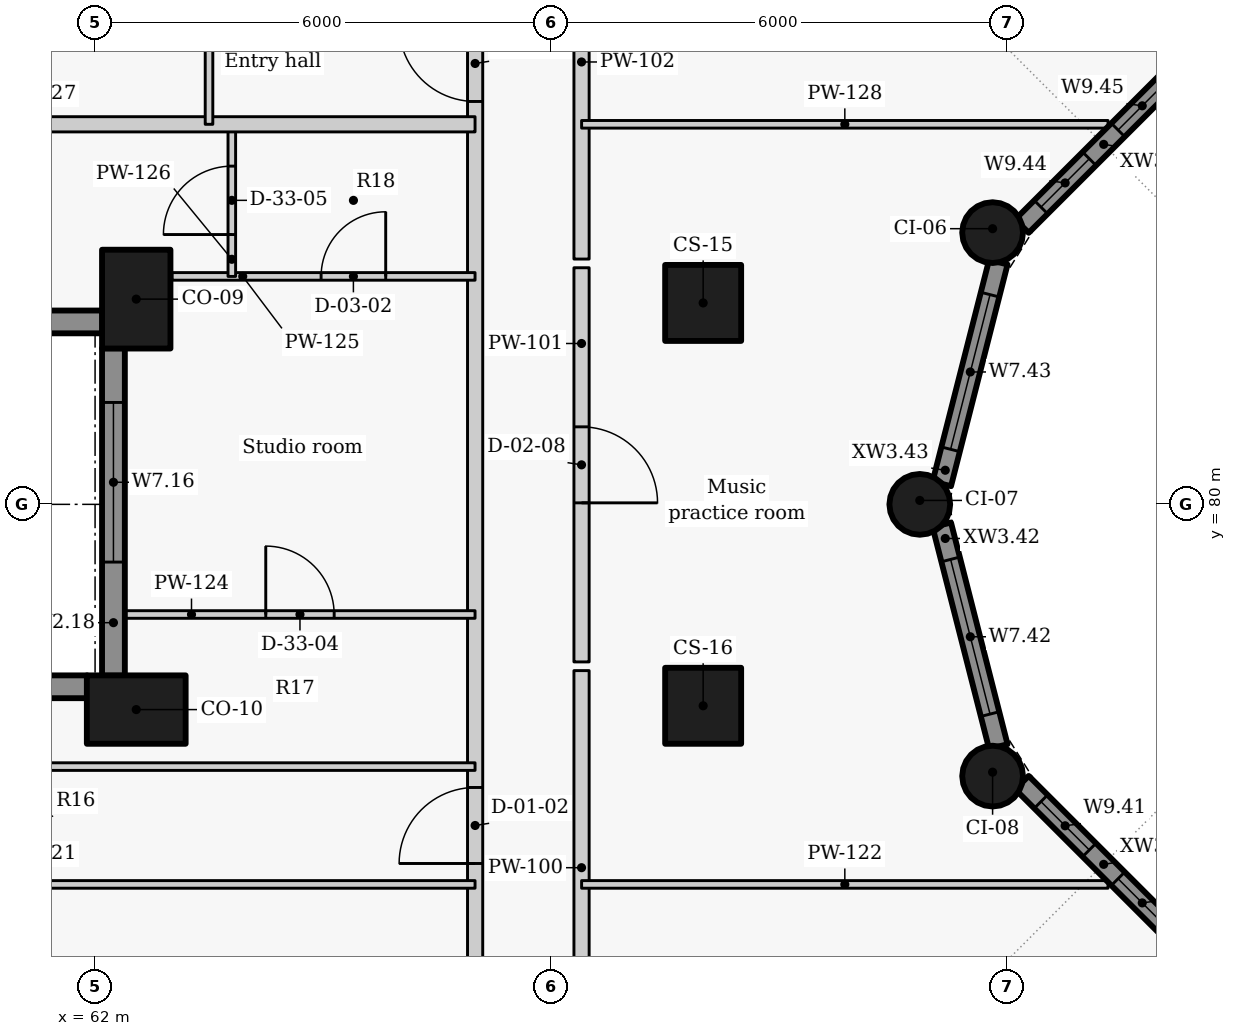
"""IFC4 building model, lengths in metres.
Left out: names, types, materials, properties, quantities, classifications, styles, units other than length and angle.
Written with IfcOpenShell. Run it as: python <this file> out.ifc"""

import sys

from ifc_helpers import new_model, si_unit, direction, frame, frame_2d, origin, origin_2d, place, context, subcontext, project, spatial, rectangle, circle, extrude, element, fill, save


model = new_model("IFC4")
c1 = context("Model", 3, precision=1e-05, world=origin(), true_north=direction((0.0, 1.0)))
c2 = subcontext(c1, "Body", "Model", "MODEL_VIEW")
j1 = project(units=[si_unit("LENGTHUNIT", "METRE"), si_unit("PLANEANGLEUNIT", "RADIAN")], contexts=[c1])
p1 = place(None, origin())
s1 = spatial("IfcSite", under=j1, at=p1, CompositionType="ELEMENT")
p2 = place(p1, origin())
s2 = spatial("IfcBuilding", under=s1, at=p2, CompositionType="ELEMENT")
p3 = place(p2, frame((0.0, 0.0, 150.3)))
s3 = spatial("IfcBuildingStorey", under=s2, at=p3, CompositionType="ELEMENT", Elevation=150.3)
for number, where, z_axis, x_axis in (
    (1, (62.542, 82.7, 0.0), (0.0, 0.0, 1.0), (0.0, -1.0, 0.0)),
    (2, (62.542, 77.3, 0.0), (0.0, 0.0, 1.0), (-1.0, 0.0, 0.0)),
):
    element("IfcColumn", number, at=place(p3, frame(where, z_axis=z_axis, x_axis=x_axis)), inside=s3, PredefinedType="COLUMN", context=c2, shape_type="SweptSolid", body=[
        extrude(rectangle(XDim=1.3, YDim=0.9, at=origin_2d()), origin(), (0.0, 0.0, 1.0), 3.3),
    ])
for number, where, z_axis, x_axis in (
    (3, (70.0, 82.65, 0.0), (0.0, 0.0, 1.0), (0.0, -1.0, 0.0)),
    (4, (70.0, 77.35, 0.0), (0.0, 0.0, 1.0), (0.0, -1.0, 0.0)),
):
    element("IfcColumn", number, at=place(p3, frame(where, z_axis=z_axis, x_axis=x_axis)), inside=s3, PredefinedType="COLUMN", context=c2, shape_type="SweptSolid", body=[
        extrude(rectangle(XDim=1.0, YDim=1.0, at=origin_2d()), origin(), (0.0, 0.0, 1.0), 3.3),
    ])
for number, where, z_axis, x_axis in (
    (5, (73.808, 83.575, 0.0), (0.0, 0.0, 1.0), (-0.5, -0.866, 0.0)),
    (6, (72.85, 80.0, 0.0), (0.0, 0.0, 1.0), (0.0, -1.0, 0.0)),
    (7, (73.808, 76.425, 0.0), (0.0, 0.0, 1.0), (0.5, -0.866, 0.0)),
):
    element("IfcColumn", number, at=place(p3, frame(where, z_axis=z_axis, x_axis=x_axis)), inside=s3, PredefinedType="COLUMN", context=c2, shape_type="SweptSolid", body=[
        extrude(circle(Radius=0.4, at=origin_2d()), origin(), (0.0, 0.0, 1.0), 3.3),
    ])
p4 = place(p3, frame((57.823, 82.4, 0.0), z_axis=(0.0, 0.0, 1.0), x_axis=(1.0, 0.0, 0.0)))
e8 = element("IfcWall", 8, at=p4, inside=s3, PredefinedType="SOLIDWALL", context=c2, shape_type="SweptSolid", body=[
    extrude(rectangle(XDim=4.273, YDim=0.3, at=frame_2d((2.136, 0.0))), origin(), (0.0, 0.0, 1.0), 2.425),
])
p5 = place(p3, frame((62.242, 82.054, 0.0), z_axis=(0.0, 0.0, 1.0), x_axis=(0.0, -1.0, 0.0)))
e9 = element("IfcWall", 9, at=p5, inside=s3, PredefinedType="SOLIDWALL", context=c2, shape_type="SweptSolid", body=[
    extrude(rectangle(XDim=4.308, YDim=0.3, at=frame_2d((2.154, 0.0))), origin(), (0.0, 0.0, 1.0), 2.425),
])
p6 = place(p5, frame((0.713, 0.0, 0.9)))
e10 = element("IfcOpeningElement", 10, at=p6, cuts=e9, PredefinedType="OPENING", context=c2, shape_type="SweptSolid", body=[
    extrude(rectangle(XDim=2.1, YDim=1.1, at=frame_2d((1.05, 0.55))), frame((0.0, 0.16, 0.0), z_axis=(0.0, -1.0, 0.0), x_axis=(1.0, 0.0, 0.0)), (0.0, 0.0, 1.0), 0.32),
])
p7 = place(p3, frame((61.896, 77.6, 0.0), z_axis=(0.0, 0.0, 1.0), x_axis=(-1.0, 0.0, 0.0)))
e11 = element("IfcWall", 11, at=p7, inside=s3, PredefinedType="SOLIDWALL", context=c2, shape_type="SweptSolid", body=[
    extrude(rectangle(XDim=4.073, YDim=0.3, at=frame_2d((2.036, 0.0))), origin(), (0.0, 0.0, 1.0), 2.425),
])
p8 = place(p7, frame((0.986, 0.0, 0.9)))
e12 = element("IfcOpeningElement", 12, at=p8, cuts=e11, PredefinedType="OPENING", context=c2, shape_type="SweptSolid", body=[
    extrude(rectangle(XDim=2.1, YDim=1.1, at=frame_2d((1.05, 0.55))), frame((0.0, 0.16, 0.0), z_axis=(0.0, -1.0, 0.0), x_axis=(1.0, 0.0, 0.0)), (0.0, 0.0, 1.0), 0.32),
])
p9 = place(p3, frame((76.339, 74.194, 0.0), z_axis=(0.0, 0.0, 1.0), x_axis=(-0.707106781187, 0.707106781187, 0.0)))
e13 = element("IfcWall", 13, at=p9, inside=s3, PredefinedType="SOLIDWALL", context=c2, shape_type="SweptSolid", body=[
    extrude(rectangle(XDim=3.033, YDim=0.25, at=frame_2d((1.517, 0.0))), origin(), (0.0, 0.0, 1.0), 2.425),
])
p10 = place(p9, frame((0.345, 0.0, 0.9)))
e14 = element("IfcOpeningElement", 14, at=p10, cuts=e13, PredefinedType="OPENING", context=c2, shape_type="SweptSolid", body=[
    extrude(rectangle(XDim=0.9, YDim=1.1, at=frame_2d((0.45, 0.55))), frame((0.0, 0.135, 0.0), z_axis=(0.0, -1.0, 0.0), x_axis=(1.0, 0.0, 0.0)), (0.0, 0.0, 1.0), 0.27),
])
p11 = place(p9, frame((1.78, 0.0, 0.9)))
e15 = element("IfcOpeningElement", 15, at=p11, cuts=e13, PredefinedType="OPENING", context=c2, shape_type="SweptSolid", body=[
    extrude(rectangle(XDim=0.9, YDim=1.1, at=frame_2d((0.45, 0.55))), frame((0.0, 0.135, 0.0), z_axis=(0.0, -1.0, 0.0), x_axis=(1.0, 0.0, 0.0)), (0.0, 0.0, 1.0), 0.27),
])
p12 = place(p3, frame((73.883, 76.813, 0.0), z_axis=(0.0, 0.0, 1.0), x_axis=(-0.247055971283, 0.969001211069, 0.0)))
e16 = element("IfcWall", 16, at=p12, inside=s3, PredefinedType="SOLIDWALL", context=c2, shape_type="SweptSolid", body=[
    extrude(rectangle(XDim=3.01, YDim=0.25, at=frame_2d((1.505, 0.0))), origin(), (0.0, 0.0, 1.0), 2.425),
])
p13 = place(p12, frame((0.441, 0.0, 0.9)))
e17 = element("IfcOpeningElement", 17, at=p13, cuts=e16, PredefinedType="OPENING", context=c2, shape_type="SweptSolid", body=[
    extrude(rectangle(XDim=2.1, YDim=1.1, at=frame_2d((1.05, 0.55))), frame((0.0, 0.135, 0.0), z_axis=(0.0, -1.0, 0.0), x_axis=(1.0, 0.0, 0.0)), (0.0, 0.0, 1.0), 0.27),
])
p14 = place(p3, frame((73.14, 80.27, 0.0), z_axis=(0.0, 0.0, 1.0), x_axis=(0.247055971283, 0.969001211069, 0.0)))
e18 = element("IfcWall", 18, at=p14, inside=s3, PredefinedType="SOLIDWALL", context=c2, shape_type="SweptSolid", body=[
    extrude(rectangle(XDim=3.01, YDim=0.25, at=frame_2d((1.505, 0.0))), origin(), (0.0, 0.0, 1.0), 2.425),
])
p15 = place(p14, frame((0.469, 0.0, 0.9)))
e19 = element("IfcOpeningElement", 19, at=p15, cuts=e18, PredefinedType="OPENING", context=c2, shape_type="SweptSolid", body=[
    extrude(rectangle(XDim=2.1, YDim=1.1, at=frame_2d((1.05, 0.55))), frame((0.0, 0.135, 0.0), z_axis=(0.0, -1.0, 0.0), x_axis=(1.0, 0.0, 0.0)), (0.0, 0.0, 1.0), 0.27),
])
p16 = place(p3, frame((74.194, 83.661, 0.0), z_axis=(0.0, 0.0, 1.0), x_axis=(0.707106781187, 0.707106781187, 0.0)))
e20 = element("IfcWall", 20, at=p16, inside=s3, PredefinedType="SOLIDWALL", context=c2, shape_type="SweptSolid", body=[
    extrude(rectangle(XDim=3.033, YDim=0.25, at=frame_2d((1.517, 0.0))), origin(), (0.0, 0.0, 1.0), 2.425),
])
p17 = place(p16, frame((0.353, 0.0, 0.9)))
e21 = element("IfcOpeningElement", 21, at=p17, cuts=e20, PredefinedType="OPENING", context=c2, shape_type="SweptSolid", body=[
    extrude(rectangle(XDim=0.9, YDim=1.1, at=frame_2d((0.45, 0.55))), frame((0.0, 0.135, 0.0), z_axis=(0.0, -1.0, 0.0), x_axis=(1.0, 0.0, 0.0)), (0.0, 0.0, 1.0), 0.27),
])
p18 = place(p16, frame((1.788, 0.0, 0.9)))
e22 = element("IfcOpeningElement", 22, at=p18, cuts=e20, PredefinedType="OPENING", context=c2, shape_type="SweptSolid", body=[
    extrude(rectangle(XDim=0.9, YDim=1.1, at=frame_2d((0.45, 0.55))), frame((0.0, 0.135, 0.0), z_axis=(0.0, -1.0, 0.0), x_axis=(1.0, 0.0, 0.0)), (0.0, 0.0, 1.0), 0.27),
])
p19 = place(p3, frame((68.4, 72.627, 0.0), z_axis=(0.0, 0.0, 1.0), x_axis=(0.0, 1.0, 0.0)))
e23 = element("IfcWall", 23, at=p19, inside=s3, PredefinedType="PARTITIONING", context=c2, shape_type="SweptSolid", body=[
    extrude(rectangle(XDim=5.186, YDim=0.2, at=frame_2d((2.593, 0.0))), origin(), (0.0, 0.0, 1.0), 3.025),
])
p20 = place(p3, frame((68.4, 83.113, 0.0), z_axis=(0.0, 0.0, 1.0), x_axis=(0.0, -1.0, 0.0)))
e24 = element("IfcWall", 24, at=p20, inside=s3, PredefinedType="PARTITIONING", context=c2, shape_type="SweptSolid", body=[
    extrude(rectangle(XDim=5.186, YDim=0.2, at=frame_2d((2.593, 0.0))), origin(), (0.0, 0.0, 1.0), 3.025),
])
p21 = place(p20, frame((2.093, 0.0, 0.0)))
e25 = element("IfcOpeningElement", 25, at=p21, cuts=e24, PredefinedType="OPENING", context=c2, shape_type="SweptSolid", body=[
    extrude(rectangle(XDim=1.0, YDim=2.1, at=frame_2d((0.5, 1.05))), frame((0.0, 0.11, 0.0), z_axis=(0.0, -1.0, 0.0), x_axis=(1.0, 0.0, 0.0)), (0.0, 0.0, 1.0), 0.22),
])
p22 = place(p3, frame((68.4, 83.227, 0.0), z_axis=(0.0, 0.0, 1.0), x_axis=(0.0, 1.0, 0.0)))
e26 = element("IfcWall", 26, at=p22, inside=s3, PredefinedType="PARTITIONING", context=c2, shape_type="SweptSolid", body=[
    extrude(rectangle(XDim=5.186, YDim=0.2, at=frame_2d((2.593, 0.0))), origin(), (0.0, 0.0, 1.0), 3.025),
])
p23 = place(p3, frame((67.0, 56.833, 0.0), z_axis=(0.0, 0.0, 1.0), x_axis=(0.0, 1.0, 0.0)))
e27 = element("IfcWall", 27, at=p23, inside=s3, PredefinedType="PARTITIONING", context=c2, shape_type="SweptSolid", body=[
    extrude(rectangle(XDim=45.661, YDim=0.2, at=frame_2d((22.831, 0.0))), origin(), (0.0, 0.0, 1.0), 2.405),
])
p24 = place(p23, frame((8.584, 0.0, 0.0)))
e28 = element("IfcOpeningElement", 28, at=p24, cuts=e27, PredefinedType="OPENING", context=c2, shape_type="SweptSolid", body=[
    extrude(rectangle(XDim=1.0, YDim=2.1, at=frame_2d((0.5, 1.05))), frame((0.0, 0.11, 0.0), z_axis=(0.0, -1.0, 0.0), x_axis=(1.0, 0.0, 0.0)), (0.0, 0.0, 1.0), 0.22),
])
p25 = place(p23, frame((18.442, 0.0, 0.0)))
e29 = element("IfcOpeningElement", 29, at=p25, cuts=e27, PredefinedType="OPENING", context=c2, shape_type="SweptSolid", body=[
    extrude(rectangle(XDim=1.0, YDim=2.1, at=frame_2d((0.5, 1.05))), frame((0.0, 0.11, 0.0), z_axis=(0.0, -1.0, 0.0), x_axis=(1.0, 0.0, 0.0)), (0.0, 0.0, 1.0), 0.22),
])
p26 = place(p23, frame((28.467, 0.0, 0.0)))
e30 = element("IfcOpeningElement", 30, at=p26, cuts=e27, PredefinedType="OPENING", context=c2, shape_type="SweptSolid", body=[
    extrude(rectangle(XDim=1.0, YDim=2.1, at=frame_2d((0.5, 1.05))), frame((0.0, 0.11, 0.0), z_axis=(0.0, -1.0, 0.0), x_axis=(1.0, 0.0, 0.0)), (0.0, 0.0, 1.0), 0.22),
])
p27 = place(p23, frame((40.953, 0.0, 0.0)))
e31 = element("IfcOpeningElement", 31, at=p27, cuts=e27, PredefinedType="OPENING", context=c2, shape_type="SweptSolid", body=[
    extrude(rectangle(XDim=1.0, YDim=2.1, at=frame_2d((0.5, 1.05))), frame((0.0, 0.11, 0.0), z_axis=(0.0, -1.0, 0.0), x_axis=(1.0, 0.0, 0.0)), (0.0, 0.0, 1.0), 0.22),
])
p28 = place(p3, frame((55.521, 75.0, 0.0), z_axis=(0.0, 0.0, 1.0), x_axis=(1.0, 0.0, 0.0)))
e32 = element("IfcWall", 32, at=p28, inside=s3, PredefinedType="PARTITIONING", context=c2, shape_type="SweptSolid", body=[
    extrude(rectangle(XDim=11.479, YDim=0.1, at=frame_2d((5.739, 0.0))), origin(), (0.0, 0.0, 1.0), 2.405),
])
p29 = place(p3, frame((68.401, 75.0, 0.0), z_axis=(0.0, 0.0, 1.0), x_axis=(1.0, 0.0, 0.0)))
e33 = element("IfcWall", 33, at=p29, inside=s3, PredefinedType="PARTITIONING", context=c2, shape_type="SweptSolid", body=[
    extrude(rectangle(XDim=6.926, YDim=0.1, at=frame_2d((3.463, 0.0))), origin(), (0.0, 0.0, 1.0), 2.505),
])
p30 = place(p3, frame((54.625, 76.55, 0.0), z_axis=(0.0, 0.0, 1.0), x_axis=(1.0, 0.0, 0.0)))
e34 = element("IfcWall", 34, at=p30, inside=s3, PredefinedType="PARTITIONING", context=c2, shape_type="SweptSolid", body=[
    extrude(rectangle(XDim=12.374, YDim=0.1, at=frame_2d((6.187, 0.0))), origin(), (0.0, 0.0, 1.0), 2.405),
])
p31 = place(p30, frame((5.737, 0.0, 0.0)))
e35 = element("IfcOpeningElement", 35, at=p31, cuts=e34, PredefinedType="OPENING", context=c2, shape_type="SweptSolid", body=[
    extrude(rectangle(XDim=0.9, YDim=2.1, at=frame_2d((0.45, 1.05))), frame((0.0, 0.06, 0.0), z_axis=(0.0, -1.0, 0.0), x_axis=(1.0, 0.0, 0.0)), (0.0, 0.0, 1.0), 0.12),
])
p32 = place(p3, frame((62.392, 78.551, 0.0), z_axis=(0.0, 0.0, 1.0), x_axis=(1.0, 0.0, 0.0)))
e36 = element("IfcWall", 36, at=p32, inside=s3, PredefinedType="PARTITIONING", context=c2, shape_type="SweptSolid", body=[
    extrude(rectangle(XDim=4.607, YDim=0.1, at=frame_2d((2.304, 0.0))), origin(), (0.0, 0.0, 1.0), 2.405),
])
p33 = place(p32, frame((1.854, 0.0, 0.0)))
e37 = element("IfcOpeningElement", 37, at=p33, cuts=e36, PredefinedType="OPENING", context=c2, shape_type="SweptSolid", body=[
    extrude(rectangle(XDim=0.9, YDim=2.1, at=frame_2d((0.45, 1.05))), frame((0.0, 0.06, 0.0), z_axis=(0.0, -1.0, 0.0), x_axis=(1.0, 0.0, 0.0)), (0.0, 0.0, 1.0), 0.12),
])
p34 = place(p3, frame((63.012, 82.999, 0.0), z_axis=(0.0, 0.0, 1.0), x_axis=(1.0, 0.0, 0.0)))
e38 = element("IfcWall", 38, at=p34, inside=s3, PredefinedType="PARTITIONING", context=c2, shape_type="SweptSolid", body=[
    extrude(rectangle(XDim=3.987, YDim=0.1, at=frame_2d((1.994, 0.0))), origin(), (0.0, 0.0, 1.0), 3.025),
])
p35 = place(p34, frame((1.962, 0.0, 0.0)))
e39 = element("IfcOpeningElement", 39, at=p35, cuts=e38, PredefinedType="OPENING", context=c2, shape_type="SweptSolid", body=[
    extrude(rectangle(XDim=0.85, YDim=2.1, at=frame_2d((0.425, 1.05))), frame((0.0, 0.06, 0.0), z_axis=(0.0, -1.0, 0.0), x_axis=(1.0, 0.0, 0.0)), (0.0, 0.0, 1.0), 0.12),
])
p36 = place(p3, frame((63.799, 82.999, 0.0), z_axis=(0.0, 0.0, 1.0), x_axis=(0.0, 1.0, 0.0)))
e40 = element("IfcWall", 40, at=p36, inside=s3, PredefinedType="PARTITIONING", context=c2, shape_type="SweptSolid", body=[
    extrude(rectangle(XDim=2.001, YDim=0.1, at=frame_2d((1.0, 0.0))), origin(), (0.0, 0.0, 1.0), 3.025),
])
p37 = place(p36, frame((0.551, 0.0, 0.0)))
e41 = element("IfcOpeningElement", 41, at=p37, cuts=e40, PredefinedType="OPENING", context=c2, shape_type="SweptSolid", body=[
    extrude(rectangle(XDim=0.9, YDim=2.1, at=frame_2d((0.45, 1.05))), frame((0.0, 0.06, 0.0), z_axis=(0.0, -1.0, 0.0), x_axis=(1.0, 0.0, 0.0)), (0.0, 0.0, 1.0), 0.12),
])
p38 = place(p3, frame((55.521, 85.0, 0.0), z_axis=(0.0, 0.0, 1.0), x_axis=(1.0, 0.0, 0.0)))
e42 = element("IfcWall", 42, at=p38, inside=s3, PredefinedType="PARTITIONING", context=c2, shape_type="SweptSolid", body=[
    extrude(rectangle(XDim=11.479, YDim=0.2, at=frame_2d((5.739, 0.0))), origin(), (0.0, 0.0, 1.0), 2.405),
])
p39 = place(p3, frame((68.401, 85.0, 0.0), z_axis=(0.0, 0.0, 1.0), x_axis=(1.0, 0.0, 0.0)))
e43 = element("IfcWall", 43, at=p39, inside=s3, PredefinedType="PARTITIONING", context=c2, shape_type="SweptSolid", body=[
    extrude(rectangle(XDim=6.926, YDim=0.1, at=frame_2d((3.463, 0.0))), origin(), (0.0, 0.0, 1.0), 2.505),
])
p40 = place(p3, frame((63.499, 85.0, 0.0), z_axis=(0.0, 0.0, 1.0), x_axis=(0.0, 1.0, 0.0)))
e44 = element("IfcWall", 44, at=p40, inside=s3, PredefinedType="PARTITIONING", context=c2, shape_type="SweptSolid", body=[
    extrude(rectangle(XDim=9.083, YDim=0.1, at=frame_2d((4.542, 0.0))), origin(), (0.0, 0.0, 1.0), 3.025),
])
p41 = place(p40, frame((4.092, 0.0, 0.0)))
e45 = element("IfcOpeningElement", 45, at=p41, cuts=e44, PredefinedType="OPENING", context=c2, shape_type="SweptSolid", body=[
    extrude(rectangle(XDim=0.9, YDim=2.1, at=frame_2d((0.45, 1.05))), frame((0.0, 0.06, 0.0), z_axis=(0.0, -1.0, 0.0), x_axis=(1.0, 0.0, 0.0)), (0.0, 0.0, 1.0), 0.12),
])
p42 = place(p6, origin())
e46 = element("IfcWindow", 46, at=p42, inside=s3, PartitioningType="SINGLE_PANEL", PredefinedType="WINDOW", context=c2, shape_type="SweptSolid", body=[
    extrude(rectangle(XDim=2.1, YDim=1.1, at=frame_2d((1.05, 0.55))), frame((0.0, 0.03, 0.0), z_axis=(0.0, -1.0, 0.0), x_axis=(1.0, 0.0, 0.0)), (0.0, 0.0, 1.0), 0.06),
])
fill(e10, e46)
p43 = place(p10, origin())
e47 = element("IfcWindow", 47, at=p43, inside=s3, PartitioningType="SINGLE_PANEL", PredefinedType="WINDOW", context=c2, shape_type="SweptSolid", body=[
    extrude(rectangle(XDim=0.9, YDim=1.1, at=frame_2d((0.45, 0.55))), frame((0.0, 0.03, 0.0), z_axis=(0.0, -1.0, 0.0), x_axis=(1.0, 0.0, 0.0)), (0.0, 0.0, 1.0), 0.06),
])
fill(e14, e47)
p44 = place(p11, origin())
e48 = element("IfcWindow", 48, at=p44, inside=s3, PartitioningType="SINGLE_PANEL", PredefinedType="WINDOW", context=c2, shape_type="SweptSolid", body=[
    extrude(rectangle(XDim=0.9, YDim=1.1, at=frame_2d((0.45, 0.55))), frame((0.0, 0.03, 0.0), z_axis=(0.0, -1.0, 0.0), x_axis=(1.0, 0.0, 0.0)), (0.0, 0.0, 1.0), 0.06),
])
fill(e15, e48)
p45 = place(p13, origin())
e49 = element("IfcWindow", 49, at=p45, inside=s3, PartitioningType="SINGLE_PANEL", PredefinedType="WINDOW", context=c2, shape_type="SweptSolid", body=[
    extrude(rectangle(XDim=2.1, YDim=1.1, at=frame_2d((1.05, 0.55))), frame((0.0, 0.03, 0.0), z_axis=(0.0, -1.0, 0.0), x_axis=(1.0, 0.0, 0.0)), (0.0, 0.0, 1.0), 0.06),
])
fill(e17, e49)
p46 = place(p15, origin())
e50 = element("IfcWindow", 50, at=p46, inside=s3, PartitioningType="SINGLE_PANEL", PredefinedType="WINDOW", context=c2, shape_type="SweptSolid", body=[
    extrude(rectangle(XDim=2.1, YDim=1.1, at=frame_2d((1.05, 0.55))), frame((0.0, 0.03, 0.0), z_axis=(0.0, -1.0, 0.0), x_axis=(1.0, 0.0, 0.0)), (0.0, 0.0, 1.0), 0.06),
])
fill(e19, e50)
p47 = place(p17, origin())
e51 = element("IfcWindow", 51, at=p47, inside=s3, PartitioningType="SINGLE_PANEL", PredefinedType="WINDOW", context=c2, shape_type="SweptSolid", body=[
    extrude(rectangle(XDim=0.9, YDim=1.1, at=frame_2d((0.45, 0.55))), frame((0.0, 0.03, 0.0), z_axis=(0.0, -1.0, 0.0), x_axis=(1.0, 0.0, 0.0)), (0.0, 0.0, 1.0), 0.06),
])
fill(e21, e51)
p48 = place(p18, origin())
e52 = element("IfcWindow", 52, at=p48, inside=s3, PartitioningType="SINGLE_PANEL", PredefinedType="WINDOW", context=c2, shape_type="SweptSolid", body=[
    extrude(rectangle(XDim=0.9, YDim=1.1, at=frame_2d((0.45, 0.55))), frame((0.0, 0.03, 0.0), z_axis=(0.0, -1.0, 0.0), x_axis=(1.0, 0.0, 0.0)), (0.0, 0.0, 1.0), 0.06),
])
fill(e22, e52)
p49 = place(p25, origin())
e53 = element("IfcDoor", 53, at=p49, inside=s3, OperationType="SINGLE_SWING_LEFT", PredefinedType="DOOR", context=c2, shape_type="SweptSolid", body=[
    extrude(rectangle(XDim=1.0, YDim=2.1, at=frame_2d((0.5, 1.05))), frame((0.0, 0.025, 0.0), z_axis=(0.0, -1.0, 0.0), x_axis=(1.0, 0.0, 0.0)), (0.0, 0.0, 1.0), 0.05),
])
fill(e29, e53)
p50 = place(p33, origin())
e54 = element("IfcDoor", 54, at=p50, inside=s3, OperationType="SINGLE_SWING_LEFT", PredefinedType="DOOR", context=c2, shape_type="SweptSolid", body=[
    extrude(rectangle(XDim=0.9, YDim=2.1, at=frame_2d((0.45, 1.05))), frame((0.0, 0.025, 0.0), z_axis=(0.0, -1.0, 0.0), x_axis=(1.0, 0.0, 0.0)), (0.0, 0.0, 1.0), 0.05),
])
fill(e37, e54)
p51 = place(p35, origin())
e55 = element("IfcDoor", 55, at=p51, inside=s3, OperationType="SINGLE_SWING_RIGHT", PredefinedType="DOOR", context=c2, shape_type="SweptSolid", body=[
    extrude(rectangle(XDim=0.85, YDim=2.1, at=frame_2d((0.425, 1.05))), frame((0.0, 0.025, 0.0), z_axis=(0.0, -1.0, 0.0), x_axis=(1.0, 0.0, 0.0)), (0.0, 0.0, 1.0), 0.05),
])
fill(e39, e55)
p52 = place(p37, origin())
e56 = element("IfcDoor", 56, at=p52, inside=s3, OperationType="SINGLE_SWING_LEFT", PredefinedType="DOOR", context=c2, shape_type="SweptSolid", body=[
    extrude(rectangle(XDim=0.9, YDim=2.1, at=frame_2d((0.45, 1.05))), frame((0.0, 0.025, 0.0), z_axis=(0.0, -1.0, 0.0), x_axis=(1.0, 0.0, 0.0)), (0.0, 0.0, 1.0), 0.05),
])
fill(e41, e56)
p53 = place(p21, origin())
e57 = element("IfcDoor", 57, at=p53, inside=s3, OperationType="SINGLE_SWING_RIGHT", PredefinedType="DOOR", context=c2, shape_type="SweptSolid", body=[
    extrude(rectangle(XDim=1.0, YDim=2.1, at=frame_2d((0.5, 1.05))), frame((0.0, 0.025, 0.0), z_axis=(0.0, -1.0, 0.0), x_axis=(1.0, 0.0, 0.0)), (0.0, 0.0, 1.0), 0.05),
])
fill(e25, e57)
p54 = place(p26, origin())
e58 = element("IfcDoor", 58, at=p54, inside=s3, OperationType="SINGLE_SWING_RIGHT", PredefinedType="DOOR", context=c2, shape_type="SweptSolid", body=[
    extrude(rectangle(XDim=1.0, YDim=2.1, at=frame_2d((0.5, 1.05))), frame((0.0, 0.025, 0.0), z_axis=(0.0, -1.0, 0.0), x_axis=(1.0, 0.0, 0.0)), (0.0, 0.0, 1.0), 0.05),
])
fill(e30, e58)
save(model, sys.argv[1])
